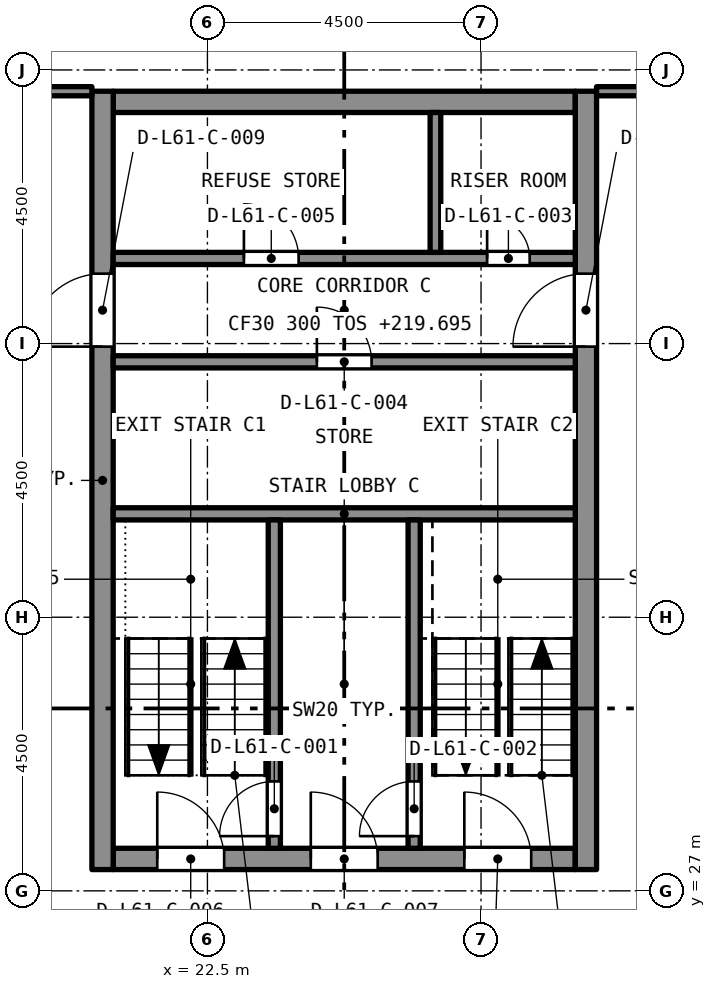
"""IFC4 building model, lengths in metres.
Left out: names, types, materials, properties, quantities, classifications, styles, units other than length and angle.
Written with IfcOpenShell. Run it as: python <this file> out.ifc"""

import sys

from ifc_helpers import new_model, si_unit, direction, frame, frame_2d, origin, place, context, subcontext, project, spatial, rectangle, extrude, element, fill, save


model = new_model("IFC4")
c1 = context("Model", 3, precision=1e-05, world=origin(), true_north=direction((0.0, 1.0)))
c2 = subcontext(c1, "Body", "Model", "MODEL_VIEW")
j1 = project(units=[si_unit("LENGTHUNIT", "METRE"), si_unit("PLANEANGLEUNIT", "RADIAN")], contexts=[c1])
p1 = place(None, origin())
s1 = spatial("IfcSite", under=j1, at=p1, CompositionType="ELEMENT")
p2 = place(p1, origin())
s2 = spatial("IfcBuilding", under=s1, at=p2, CompositionType="ELEMENT")
p3 = place(p2, frame((0.0, 0.0, 219.695)))
s3 = spatial("IfcBuildingStorey", under=s2, at=p3, CompositionType="ELEMENT", Elevation=219.695)
p4 = place(p3, frame((20.95, 27.525, 0.0), z_axis=(0.0, 0.0, 1.0), x_axis=(1.0, 0.0, 0.0)))
e1 = element("IfcWall", 1, at=p4, inside=s3, PredefinedType="SOLIDWALL", context=c2, shape_type="SweptSolid", body=[
    extrude(rectangle(XDim=7.6, YDim=0.35, at=frame_2d((3.8, 0.0))), origin(), (0.0, 0.0, 1.0), 3.2),
])
p5 = place(p4, frame((0.725, 0.0, 0.0)))
e2 = element("IfcOpeningElement", 2, at=p5, cuts=e1, PredefinedType="OPENING", context=c2, shape_type="SweptSolid", body=[
    extrude(rectangle(XDim=1.1, YDim=2.1, at=frame_2d((0.55, 1.05))), frame((0.0, 0.185, 0.0), z_axis=(0.0, -1.0, 0.0), x_axis=(1.0, 0.0, 0.0)), (0.0, 0.0, 1.0), 0.37),
])
p6 = place(p4, frame((3.25, 0.0, 0.0)))
e3 = element("IfcOpeningElement", 3, at=p6, cuts=e1, PredefinedType="OPENING", context=c2, shape_type="SweptSolid", body=[
    extrude(rectangle(XDim=1.1, YDim=2.1, at=frame_2d((0.55, 1.05))), frame((0.0, 0.185, 0.0), z_axis=(0.0, -1.0, 0.0), x_axis=(1.0, 0.0, 0.0)), (0.0, 0.0, 1.0), 0.37),
])
p7 = place(p4, frame((5.775, 0.0, 0.0)))
e4 = element("IfcOpeningElement", 4, at=p7, cuts=e1, PredefinedType="OPENING", context=c2, shape_type="SweptSolid", body=[
    extrude(rectangle(XDim=1.1, YDim=2.1, at=frame_2d((0.55, 1.05))), frame((0.0, 0.185, 0.0), z_axis=(0.0, -1.0, 0.0), x_axis=(1.0, 0.0, 0.0)), (0.0, 0.0, 1.0), 0.37),
])
p8 = place(p3, frame((20.95, 39.975, 0.0), z_axis=(0.0, 0.0, 1.0), x_axis=(1.0, 0.0, 0.0)))
e5 = element("IfcWall", 5, at=p8, inside=s3, PredefinedType="SOLIDWALL", context=c2, shape_type="SweptSolid", body=[
    extrude(rectangle(XDim=7.6, YDim=0.35, at=frame_2d((3.8, 0.0))), origin(), (0.0, 0.0, 1.0), 3.2),
])
p9 = place(p3, frame((20.775, 27.35, 0.0), z_axis=(0.0, 0.0, 1.0), x_axis=(0.0, 1.0, 0.0)))
e6 = element("IfcWall", 6, at=p9, inside=s3, PredefinedType="SOLIDWALL", context=c2, shape_type="SweptSolid", body=[
    extrude(rectangle(XDim=12.8, YDim=0.35, at=frame_2d((6.4, 0.0))), origin(), (0.0, 0.0, 1.0), 3.2),
])
p10 = place(p9, frame((8.6, 0.0, 0.0)))
e7 = element("IfcOpeningElement", 7, at=p10, cuts=e6, PredefinedType="OPENING", context=c2, shape_type="SweptSolid", body=[
    extrude(rectangle(XDim=1.2, YDim=2.1, at=frame_2d((0.6, 1.05))), frame((0.0, 0.185, 0.0), z_axis=(0.0, -1.0, 0.0), x_axis=(1.0, 0.0, 0.0)), (0.0, 0.0, 1.0), 0.37),
])
p11 = place(p3, frame((28.725, 27.35, 0.0), z_axis=(0.0, 0.0, 1.0), x_axis=(0.0, 1.0, 0.0)))
e8 = element("IfcWall", 8, at=p11, inside=s3, PredefinedType="SOLIDWALL", context=c2, shape_type="SweptSolid", body=[
    extrude(rectangle(XDim=12.8, YDim=0.35, at=frame_2d((6.4, 0.0))), origin(), (0.0, 0.0, 1.0), 3.2),
])
p12 = place(p11, frame((8.6, 0.0, 0.0)))
e9 = element("IfcOpeningElement", 9, at=p12, cuts=e8, PredefinedType="OPENING", context=c2, shape_type="SweptSolid", body=[
    extrude(rectangle(XDim=1.2, YDim=2.1, at=frame_2d((0.6, 1.05))), frame((0.0, 0.185, 0.0), z_axis=(0.0, -1.0, 0.0), x_axis=(1.0, 0.0, 0.0)), (0.0, 0.0, 1.0), 0.37),
])
p13 = place(p3, frame((18.4, 40.15, 0.0), z_axis=(0.0, 0.0, 1.0), x_axis=(1.0, 0.0, 0.0)))
e10 = element("IfcWall", 10, at=p13, inside=s3, PredefinedType="PARTITIONING", context=c2, shape_type="SweptSolid", body=[
    extrude(rectangle(XDim=2.2, YDim=0.15, at=frame_2d((1.1, 0.0))), origin(), (0.0, 0.0, 1.0), 2.75),
])
p14 = place(p13, frame((0.2, 0.0, 0.0)))
e11 = element("IfcOpeningElement", 11, at=p14, cuts=e10, PredefinedType="OPENING", context=c2, shape_type="SweptSolid", body=[
    extrude(rectangle(XDim=1.0, YDim=2.1, at=frame_2d((0.5, 1.05))), frame((0.0, 0.085, 0.0), z_axis=(0.0, -1.0, 0.0), x_axis=(1.0, 0.0, 0.0)), (0.0, 0.0, 1.0), 0.17),
])
p15 = place(p3, frame((28.9, 40.15, 0.0), z_axis=(0.0, 0.0, 1.0), x_axis=(1.0, 0.0, 0.0)))
e12 = element("IfcWall", 12, at=p15, inside=s3, PredefinedType="PARTITIONING", context=c2, shape_type="SweptSolid", body=[
    extrude(rectangle(XDim=2.2, YDim=0.15, at=frame_2d((1.1, 0.0))), origin(), (0.0, 0.0, 1.0), 2.75),
])
p16 = place(p3, frame((20.95, 33.2, 0.0), z_axis=(0.0, 0.0, 1.0), x_axis=(1.0, 0.0, 0.0)))
e13 = element("IfcWall", 13, at=p16, inside=s3, PredefinedType="SOLIDWALL", context=c2, shape_type="SweptSolid", body=[
    extrude(rectangle(XDim=7.6, YDim=0.2, at=frame_2d((3.8, 0.0))), origin(), (0.0, 0.0, 1.0), 2.9),
])
p17 = place(p3, frame((20.95, 35.7, 0.0), z_axis=(0.0, 0.0, 1.0), x_axis=(1.0, 0.0, 0.0)))
e14 = element("IfcWall", 14, at=p17, inside=s3, PredefinedType="SOLIDWALL", context=c2, shape_type="SweptSolid", body=[
    extrude(rectangle(XDim=7.6, YDim=0.2, at=frame_2d((3.8, 0.0))), origin(), (0.0, 0.0, 1.0), 2.9),
])
p18 = place(p17, frame((3.35, 0.0, 0.0)))
e15 = element("IfcOpeningElement", 15, at=p18, cuts=e14, PredefinedType="OPENING", context=c2, shape_type="SweptSolid", body=[
    extrude(rectangle(XDim=0.9, YDim=2.1, at=frame_2d((0.45, 1.05))), frame((0.0, 0.11, 0.0), z_axis=(0.0, -1.0, 0.0), x_axis=(1.0, 0.0, 0.0)), (0.0, 0.0, 1.0), 0.22),
])
p19 = place(p3, frame((20.95, 37.4, 0.0), z_axis=(0.0, 0.0, 1.0), x_axis=(1.0, 0.0, 0.0)))
e16 = element("IfcWall", 16, at=p19, inside=s3, PredefinedType="SOLIDWALL", context=c2, shape_type="SweptSolid", body=[
    extrude(rectangle(XDim=7.6, YDim=0.2, at=frame_2d((3.8, 0.0))), origin(), (0.0, 0.0, 1.0), 2.9),
])
p20 = place(p19, frame((6.15, 0.0, 0.0)))
e17 = element("IfcOpeningElement", 17, at=p20, cuts=e16, PredefinedType="OPENING", context=c2, shape_type="SweptSolid", body=[
    extrude(rectangle(XDim=0.7, YDim=2.1, at=frame_2d((0.35, 1.05))), frame((0.0, 0.11, 0.0), z_axis=(0.0, -1.0, 0.0), x_axis=(1.0, 0.0, 0.0)), (0.0, 0.0, 1.0), 0.22),
])
p21 = place(p19, frame((2.15, 0.0, 0.0)))
e18 = element("IfcOpeningElement", 18, at=p21, cuts=e16, PredefinedType="OPENING", context=c2, shape_type="SweptSolid", body=[
    extrude(rectangle(XDim=0.9, YDim=2.1, at=frame_2d((0.45, 1.05))), frame((0.0, 0.11, 0.0), z_axis=(0.0, -1.0, 0.0), x_axis=(1.0, 0.0, 0.0)), (0.0, 0.0, 1.0), 0.22),
])
p22 = place(p3, frame((23.6, 27.7, 0.0), z_axis=(0.0, 0.0, 1.0), x_axis=(0.0, 1.0, 0.0)))
e19 = element("IfcWall", 19, at=p22, inside=s3, PredefinedType="SOLIDWALL", context=c2, shape_type="SweptSolid", body=[
    extrude(rectangle(XDim=5.4, YDim=0.2, at=frame_2d((2.7, 0.0))), origin(), (0.0, 0.0, 1.0), 2.9),
])
p23 = place(p22, frame((0.2, 0.0, 0.0)))
e20 = element("IfcOpeningElement", 20, at=p23, cuts=e19, PredefinedType="OPENING", context=c2, shape_type="SweptSolid", body=[
    extrude(rectangle(XDim=0.9, YDim=2.1, at=frame_2d((0.45, 1.05))), frame((0.0, 0.11, 0.0), z_axis=(0.0, -1.0, 0.0), x_axis=(1.0, 0.0, 0.0)), (0.0, 0.0, 1.0), 0.22),
])
p24 = place(p3, frame((25.9, 27.7, 0.0), z_axis=(0.0, 0.0, 1.0), x_axis=(0.0, 1.0, 0.0)))
e21 = element("IfcWall", 21, at=p24, inside=s3, PredefinedType="SOLIDWALL", context=c2, shape_type="SweptSolid", body=[
    extrude(rectangle(XDim=5.4, YDim=0.2, at=frame_2d((2.7, 0.0))), origin(), (0.0, 0.0, 1.0), 2.9),
])
p25 = place(p24, frame((0.2, 0.0, 0.0)))
e22 = element("IfcOpeningElement", 22, at=p25, cuts=e21, PredefinedType="OPENING", context=c2, shape_type="SweptSolid", body=[
    extrude(rectangle(XDim=0.9, YDim=2.1, at=frame_2d((0.45, 1.05))), frame((0.0, 0.11, 0.0), z_axis=(0.0, -1.0, 0.0), x_axis=(1.0, 0.0, 0.0)), (0.0, 0.0, 1.0), 0.22),
])
p26 = place(p3, frame((26.25, 37.5, 0.0), z_axis=(0.0, 0.0, 1.0), x_axis=(0.0, 1.0, 0.0)))
e23 = element("IfcWall", 23, at=p26, inside=s3, PredefinedType="SOLIDWALL", context=c2, shape_type="SweptSolid", body=[
    extrude(rectangle(XDim=2.3, YDim=0.175, at=frame_2d((1.15, 0.0))), origin(), (0.0, 0.0, 1.0), 2.9),
])
p27 = place(p23, origin())
e24 = element("IfcDoor", 24, at=p27, inside=s3, OperationType="SINGLE_SWING_LEFT", PredefinedType="DOOR", context=c2, shape_type="SweptSolid", body=[
    extrude(rectangle(XDim=0.9, YDim=2.1, at=frame_2d((0.45, 1.05))), frame((0.0, 0.025, 0.0), z_axis=(0.0, -1.0, 0.0), x_axis=(1.0, 0.0, 0.0)), (0.0, 0.0, 1.0), 0.05),
])
fill(e20, e24)
p28 = place(p25, origin())
e25 = element("IfcDoor", 25, at=p28, inside=s3, OperationType="SINGLE_SWING_LEFT", PredefinedType="DOOR", context=c2, shape_type="SweptSolid", body=[
    extrude(rectangle(XDim=0.9, YDim=2.1, at=frame_2d((0.45, 1.05))), frame((0.0, 0.025, 0.0), z_axis=(0.0, -1.0, 0.0), x_axis=(1.0, 0.0, 0.0)), (0.0, 0.0, 1.0), 0.05),
])
fill(e22, e25)
p29 = place(p20, origin())
e26 = element("IfcDoor", 26, at=p29, inside=s3, OperationType="SINGLE_SWING_LEFT", PredefinedType="DOOR", context=c2, shape_type="SweptSolid", body=[
    extrude(rectangle(XDim=0.7, YDim=2.1, at=frame_2d((0.35, 1.05))), frame((0.0, 0.025, 0.0), z_axis=(0.0, -1.0, 0.0), x_axis=(1.0, 0.0, 0.0)), (0.0, 0.0, 1.0), 0.05),
])
fill(e17, e26)
p30 = place(p18, origin())
e27 = element("IfcDoor", 27, at=p30, inside=s3, OperationType="SINGLE_SWING_LEFT", PredefinedType="DOOR", context=c2, shape_type="SweptSolid", body=[
    extrude(rectangle(XDim=0.9, YDim=2.1, at=frame_2d((0.45, 1.05))), frame((0.0, 0.025, 0.0), z_axis=(0.0, -1.0, 0.0), x_axis=(1.0, 0.0, 0.0)), (0.0, 0.0, 1.0), 0.05),
])
fill(e15, e27)
p31 = place(p21, origin())
e28 = element("IfcDoor", 28, at=p31, inside=s3, OperationType="SINGLE_SWING_LEFT", PredefinedType="DOOR", context=c2, shape_type="SweptSolid", body=[
    extrude(rectangle(XDim=0.9, YDim=2.1, at=frame_2d((0.45, 1.05))), frame((0.0, 0.025, 0.0), z_axis=(0.0, -1.0, 0.0), x_axis=(1.0, 0.0, 0.0)), (0.0, 0.0, 1.0), 0.05),
])
fill(e18, e28)
p32 = place(p5, origin())
e29 = element("IfcDoor", 29, at=p32, inside=s3, OperationType="SINGLE_SWING_LEFT", PredefinedType="DOOR", context=c2, shape_type="SweptSolid", body=[
    extrude(rectangle(XDim=1.1, YDim=2.1, at=frame_2d((0.55, 1.05))), frame((0.0, 0.025, 0.0), z_axis=(0.0, -1.0, 0.0), x_axis=(1.0, 0.0, 0.0)), (0.0, 0.0, 1.0), 0.05),
])
fill(e2, e29)
p33 = place(p6, origin())
e30 = element("IfcDoor", 30, at=p33, inside=s3, OperationType="SINGLE_SWING_LEFT", PredefinedType="DOOR", context=c2, shape_type="SweptSolid", body=[
    extrude(rectangle(XDim=1.1, YDim=2.1, at=frame_2d((0.55, 1.05))), frame((0.0, 0.025, 0.0), z_axis=(0.0, -1.0, 0.0), x_axis=(1.0, 0.0, 0.0)), (0.0, 0.0, 1.0), 0.05),
])
fill(e3, e30)
p34 = place(p7, origin())
e31 = element("IfcDoor", 31, at=p34, inside=s3, OperationType="SINGLE_SWING_LEFT", PredefinedType="DOOR", context=c2, shape_type="SweptSolid", body=[
    extrude(rectangle(XDim=1.1, YDim=2.1, at=frame_2d((0.55, 1.05))), frame((0.0, 0.025, 0.0), z_axis=(0.0, -1.0, 0.0), x_axis=(1.0, 0.0, 0.0)), (0.0, 0.0, 1.0), 0.05),
])
fill(e4, e31)
p35 = place(p10, origin())
e32 = element("IfcDoor", 32, at=p35, inside=s3, OperationType="SINGLE_SWING_LEFT", PredefinedType="DOOR", context=c2, shape_type="SweptSolid", body=[
    extrude(rectangle(XDim=1.2, YDim=2.1, at=frame_2d((0.6, 1.05))), frame((0.0, 0.025, 0.0), z_axis=(0.0, -1.0, 0.0), x_axis=(1.0, 0.0, 0.0)), (0.0, 0.0, 1.0), 0.05),
])
fill(e7, e32)
p36 = place(p12, origin())
e33 = element("IfcDoor", 33, at=p36, inside=s3, OperationType="SINGLE_SWING_LEFT", PredefinedType="DOOR", context=c2, shape_type="SweptSolid", body=[
    extrude(rectangle(XDim=1.2, YDim=2.1, at=frame_2d((0.6, 1.05))), frame((0.0, 0.025, 0.0), z_axis=(0.0, -1.0, 0.0), x_axis=(1.0, 0.0, 0.0)), (0.0, 0.0, 1.0), 0.05),
])
fill(e9, e33)
save(model, sys.argv[1])
